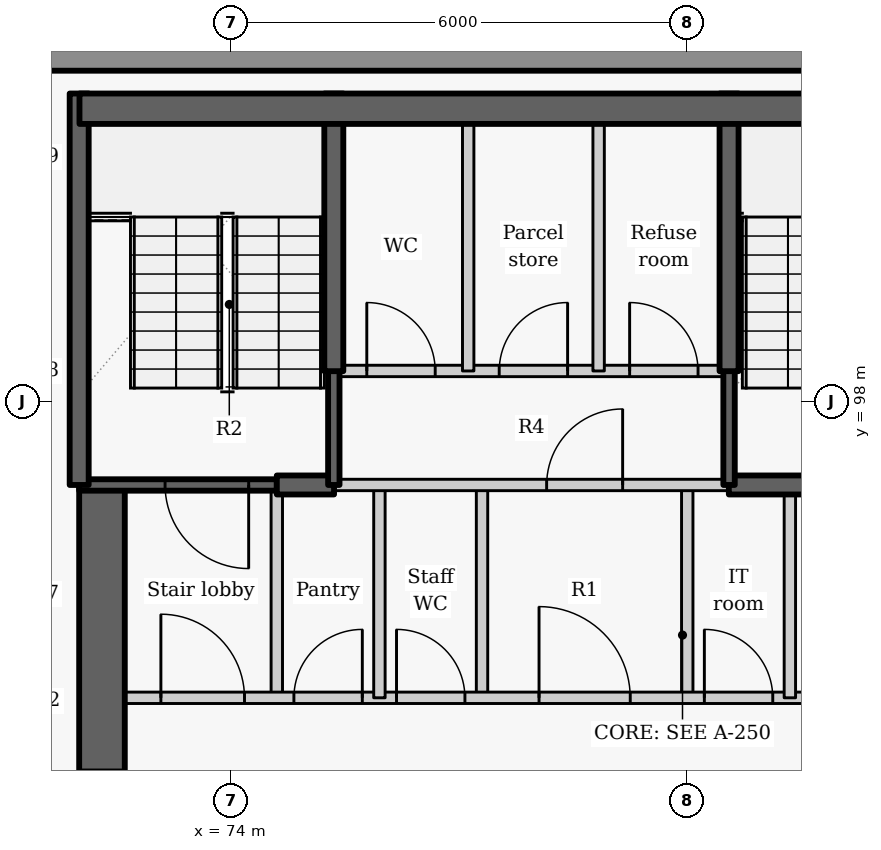
"""IFC4 building model, lengths in metres.
Left out: names, types, materials, properties, quantities, classifications, styles, units other than length and angle.
Written with IfcOpenShell. Run it as: python <this file> out.ifc"""

import sys

from ifc_helpers import new_model, si_unit, direction, frame, frame_2d, origin, place, context, subcontext, project, spatial, rectangle, extrude, element, fill, save


model = new_model("IFC4")
c1 = context("Model", 3, precision=1e-05, world=origin(), true_north=direction((0.0, 1.0)))
c2 = subcontext(c1, "Body", "Model", "MODEL_VIEW")
j1 = project(units=[si_unit("LENGTHUNIT", "METRE"), si_unit("PLANEANGLEUNIT", "RADIAN")], contexts=[c1])
p1 = place(None, origin())
s1 = spatial("IfcSite", under=j1, at=p1, CompositionType="ELEMENT")
p2 = place(p1, origin())
s2 = spatial("IfcBuilding", under=s1, at=p2, CompositionType="ELEMENT")
p3 = place(p2, frame((0.0, 0.0, 290.4)))
s3 = spatial("IfcBuildingStorey", under=s2, at=p3, CompositionType="ELEMENT", Elevation=290.4)
p4 = place(p3, frame((89.549, 102.5, 0.0), z_axis=(0.0, 0.0, 1.0), x_axis=(-1.0, 0.0, 0.0)))
e1 = element("IfcWall", 1, at=p4, inside=s3, PredefinedType="SOLIDWALL", context=c2, shape_type="SweptSolid", body=[
    extrude(rectangle(XDim=19.134, YDim=0.3, at=frame_2d((9.567, 0.0))), origin(), (0.0, 0.0, 1.0), 2.725),
])
p5 = place(p3, frame((74.6, 94.1, 0.0), z_axis=(0.0, 0.0, 1.0), x_axis=(0.0, 1.0, 0.0)))
e2 = element("IfcWall", 2, at=p5, inside=s3, PredefinedType="PARTITIONING", context=c2, shape_type="SweptSolid", body=[
    extrude(rectangle(XDim=2.8, YDim=0.15, at=frame_2d((1.4, 0.0))), origin(), (0.0, 0.0, 1.0), 3.325),
])
p6 = place(p3, frame((72.3, 87.8, -0.275), z_axis=(0.0, 0.0, 1.0), x_axis=(0.0, 1.0, 0.0)))
e3 = element("IfcWall", 3, at=p6, inside=s3, PredefinedType="SHEAR", context=c2, shape_type="SweptSolid", body=[
    extrude(rectangle(XDim=9.1, YDim=0.6, at=frame_2d((4.55, 0.0))), origin(), (0.0, 0.0, 1.0), 3.6),
])
p7 = place(p6, frame((3.85, 0.0, 0.275)))
e4 = element("IfcOpeningElement", 4, at=p7, cuts=e3, PredefinedType="OPENING", context=c2, shape_type="SweptSolid", body=[
    extrude(rectangle(XDim=1.5, YDim=2.1, at=frame_2d((0.75, 1.05))), frame((0.0, 0.31, 0.0), z_axis=(0.0, -1.0, 0.0), x_axis=(1.0, 0.0, 0.0)), (0.0, 0.0, 1.0), 0.62),
])
for number, where, z_axis, x_axis in (
    (5, (77.3, 94.1, 0.0), (0.0, 0.0, 1.0), (0.0, 1.0, 0.0)),
    (6, (80.0, 94.1, 0.0), (0.0, 0.0, 1.0), (0.0, 1.0, 0.0)),
):
    element("IfcWall", number, at=place(p3, frame(where, z_axis=z_axis, x_axis=x_axis)), inside=s3, PredefinedType="PARTITIONING", context=c2, shape_type="SweptSolid", body=[
        extrude(rectangle(XDim=2.8, YDim=0.15, at=frame_2d((1.4, 0.0))), origin(), (0.0, 0.0, 1.0), 3.325),
    ])
p8 = place(p3, frame((72.0, 94.1, 0.0), z_axis=(0.0, 0.0, 1.0), x_axis=(1.0, 0.0, 0.0)))
e7 = element("IfcWall", 7, at=p8, inside=s3, PredefinedType="PARTITIONING", context=c2, shape_type="SweptSolid", body=[
    extrude(rectangle(XDim=10.703, YDim=0.15, at=frame_2d((5.352, 0.0))), origin(), (0.0, 0.0, 1.0), 3.325),
])
p9 = place(p8, frame((1.075, 0.0, 0.0)))
e8 = element("IfcOpeningElement", 8, at=p9, cuts=e7, PredefinedType="OPENING", context=c2, shape_type="SweptSolid", body=[
    extrude(rectangle(XDim=1.1, YDim=2.1, at=frame_2d((0.55, 1.05))), frame((0.0, 0.085, 0.0), z_axis=(0.0, -1.0, 0.0), x_axis=(1.0, 0.0, 0.0)), (0.0, 0.0, 1.0), 0.17),
])
p10 = place(p8, frame((2.825, 0.0, 0.0)))
e9 = element("IfcOpeningElement", 9, at=p10, cuts=e7, PredefinedType="OPENING", context=c2, shape_type="SweptSolid", body=[
    extrude(rectangle(XDim=0.9, YDim=2.1, at=frame_2d((0.45, 1.05))), frame((0.0, 0.085, 0.0), z_axis=(0.0, -1.0, 0.0), x_axis=(1.0, 0.0, 0.0)), (0.0, 0.0, 1.0), 0.17),
])
p11 = place(p8, frame((4.175, 0.0, 0.0)))
e10 = element("IfcOpeningElement", 10, at=p11, cuts=e7, PredefinedType="OPENING", context=c2, shape_type="SweptSolid", body=[
    extrude(rectangle(XDim=0.9, YDim=2.1, at=frame_2d((0.45, 1.05))), frame((0.0, 0.085, 0.0), z_axis=(0.0, -1.0, 0.0), x_axis=(1.0, 0.0, 0.0)), (0.0, 0.0, 1.0), 0.17),
])
p12 = place(p8, frame((6.05, 0.0, 0.0)))
e11 = element("IfcOpeningElement", 11, at=p12, cuts=e7, PredefinedType="OPENING", context=c2, shape_type="SweptSolid", body=[
    extrude(rectangle(XDim=1.2, YDim=2.1, at=frame_2d((0.6, 1.05))), frame((0.0, 0.085, 0.0), z_axis=(0.0, -1.0, 0.0), x_axis=(1.0, 0.0, 0.0)), (0.0, 0.0, 1.0), 0.17),
])
p13 = place(p8, frame((8.225, 0.0, 0.0)))
e12 = element("IfcOpeningElement", 12, at=p13, cuts=e7, PredefinedType="OPENING", context=c2, shape_type="SweptSolid", body=[
    extrude(rectangle(XDim=0.9, YDim=2.1, at=frame_2d((0.45, 1.05))), frame((0.0, 0.085, 0.0), z_axis=(0.0, -1.0, 0.0), x_axis=(1.0, 0.0, 0.0)), (0.0, 0.0, 1.0), 0.17),
])
p14 = place(p8, frame((9.575, 0.0, 0.0)))
e13 = element("IfcOpeningElement", 13, at=p14, cuts=e7, PredefinedType="OPENING", context=c2, shape_type="SweptSolid", body=[
    extrude(rectangle(XDim=0.9, YDim=2.1, at=frame_2d((0.45, 1.05))), frame((0.0, 0.085, 0.0), z_axis=(0.0, -1.0, 0.0), x_axis=(1.0, 0.0, 0.0)), (0.0, 0.0, 1.0), 0.17),
])
p15 = place(p3, frame((74.6, 96.9, -0.275), z_axis=(0.0, 0.0, 1.0), x_axis=(-1.0, 0.0, 0.0)))
e14 = element("IfcWall", 14, at=p15, inside=s3, PredefinedType="SHEAR", context=c2, shape_type="SweptSolid", body=[
    extrude(rectangle(XDim=2.6, YDim=0.15, at=frame_2d((1.3, 0.0))), origin(), (0.0, 0.0, 1.0), 3.6),
])
p16 = place(p15, frame((0.37, 0.0, 0.275)))
e15 = element("IfcOpeningElement", 15, at=p16, cuts=e14, PredefinedType="OPENING", context=c2, shape_type="SweptSolid", body=[
    extrude(rectangle(XDim=1.1, YDim=2.1, at=frame_2d((0.55, 1.05))), frame((0.0, 0.085, 0.0), z_axis=(0.0, -1.0, 0.0), x_axis=(1.0, 0.0, 0.0)), (0.0, 0.0, 1.0), 0.17),
])
p17 = place(p3, frame((75.95, 94.1, 0.0), z_axis=(0.0, 0.0, 1.0), x_axis=(0.0, 1.0, 0.0)))
e16 = element("IfcWall", 16, at=p17, inside=s3, PredefinedType="PARTITIONING", context=c2, shape_type="SweptSolid", body=[
    extrude(rectangle(XDim=2.8, YDim=0.15, at=frame_2d((1.4, 0.0))), origin(), (0.0, 0.0, 1.0), 3.325),
])
p18 = place(p3, frame((74.6, 96.9, -0.275), z_axis=(0.0, 0.0, 1.0), x_axis=(1.0, 0.0, 0.0)))
e17 = element("IfcWall", 17, at=p18, inside=s3, PredefinedType="SHEAR", context=c2, shape_type="SweptSolid", body=[
    extrude(rectangle(XDim=0.753, YDim=0.25, at=frame_2d((0.376, 0.0))), origin(), (0.0, 0.0, 1.0), 3.6),
])
p19 = place(p3, frame((80.547, 96.9, -0.275), z_axis=(0.0, 0.0, 1.0), x_axis=(1.0, 0.0, 0.0)))
e18 = element("IfcWall", 18, at=p19, inside=s3, PredefinedType="SHEAR", context=c2, shape_type="SweptSolid", body=[
    extrude(rectangle(XDim=7.453, YDim=0.25, at=frame_2d((3.727, 0.0))), origin(), (0.0, 0.0, 1.0), 3.6),
])
p20 = place(p19, frame((3.302, 0.0, 0.275)))
e19 = element("IfcOpeningElement", 19, at=p20, cuts=e18, PredefinedType="OPENING", context=c2, shape_type="SweptSolid", body=[
    extrude(rectangle(XDim=1.1, YDim=2.1, at=frame_2d((0.55, 1.05))), frame((0.0, 0.135, 0.0), z_axis=(0.0, -1.0, 0.0), x_axis=(1.0, 0.0, 0.0)), (0.0, 0.0, 1.0), 0.27),
])
p21 = place(p3, frame((75.347, 96.9, 0.0), z_axis=(0.0, 0.0, 1.0), x_axis=(1.0, 0.0, 0.0)))
e20 = element("IfcWall", 20, at=p21, inside=s3, PredefinedType="PARTITIONING", context=c2, shape_type="SweptSolid", body=[
    extrude(rectangle(XDim=5.206, YDim=0.15, at=frame_2d((2.603, 0.0))), origin(), (0.0, 0.0, 1.0), 3.325),
])
p22 = place(p21, frame((2.803, 0.0, 0.0)))
e21 = element("IfcOpeningElement", 21, at=p22, cuts=e20, PredefinedType="OPENING", context=c2, shape_type="SweptSolid", body=[
    extrude(rectangle(XDim=1.0, YDim=2.1, at=frame_2d((0.5, 1.05))), frame((0.0, 0.085, 0.0), z_axis=(0.0, -1.0, 0.0), x_axis=(1.0, 0.0, 0.0)), (0.0, 0.0, 1.0), 0.17),
])
p23 = place(p3, frame((81.35, 94.1, 0.0), z_axis=(0.0, 0.0, 1.0), x_axis=(0.0, 1.0, 0.0)))
e22 = element("IfcWall", 22, at=p23, inside=s3, PredefinedType="PARTITIONING", context=c2, shape_type="SweptSolid", body=[
    extrude(rectangle(XDim=2.8, YDim=0.15, at=frame_2d((1.4, 0.0))), origin(), (0.0, 0.0, 1.0), 3.325),
])
p24 = place(p3, frame((75.35, 96.9, -0.275), z_axis=(0.0, 0.0, 1.0), x_axis=(0.0, 1.0, 0.0)))
e23 = element("IfcWall", 23, at=p24, inside=s3, PredefinedType="SHEAR", context=c2, shape_type="SweptSolid", body=[
    extrude(rectangle(XDim=1.503, YDim=0.15, at=frame_2d((0.751, 0.0))), origin(), (0.0, 0.0, 1.0), 3.6),
])
p25 = place(p3, frame((75.35, 98.397, -0.275), z_axis=(0.0, 0.0, 1.0), x_axis=(0.0, 1.0, 0.0)))
e24 = element("IfcWall", 24, at=p25, inside=s3, PredefinedType="SHEAR", context=c2, shape_type="SweptSolid", body=[
    extrude(rectangle(XDim=3.653, YDim=0.25, at=frame_2d((1.827, 0.0))), origin(), (0.0, 0.0, 1.0), 3.6),
])
p26 = place(p3, frame((72.0, 96.9, -0.275), z_axis=(0.0, 0.0, 1.0), x_axis=(0.0, 1.0, 0.0)))
e25 = element("IfcWall", 25, at=p26, inside=s3, PredefinedType="SHEAR", context=c2, shape_type="SweptSolid", body=[
    extrude(rectangle(XDim=5.15, YDim=0.25, at=frame_2d((2.575, 0.0))), origin(), (0.0, 0.0, 1.0), 3.6),
])
p27 = place(p3, frame((80.55, 96.9, -0.275), z_axis=(0.0, 0.0, 1.0), x_axis=(0.0, 1.0, 0.0)))
e26 = element("IfcWall", 26, at=p27, inside=s3, PredefinedType="SHEAR", context=c2, shape_type="SweptSolid", body=[
    extrude(rectangle(XDim=1.503, YDim=0.15, at=frame_2d((0.751, 0.0))), origin(), (0.0, 0.0, 1.0), 3.6),
])
p28 = place(p3, frame((80.55, 98.397, -0.275), z_axis=(0.0, 0.0, 1.0), x_axis=(0.0, 1.0, 0.0)))
e27 = element("IfcWall", 27, at=p28, inside=s3, PredefinedType="SHEAR", context=c2, shape_type="SweptSolid", body=[
    extrude(rectangle(XDim=3.653, YDim=0.25, at=frame_2d((1.827, 0.0))), origin(), (0.0, 0.0, 1.0), 3.6),
])
p29 = place(p3, frame((75.35, 98.4, 0.0), z_axis=(0.0, 0.0, 1.0), x_axis=(1.0, 0.0, 0.0)))
e28 = element("IfcWall", 28, at=p29, inside=s3, PredefinedType="PARTITIONING", context=c2, shape_type="SweptSolid", body=[
    extrude(rectangle(XDim=5.2, YDim=0.15, at=frame_2d((2.6, 0.0))), origin(), (0.0, 0.0, 1.0), 3.325),
])
p30 = place(p29, frame((0.434, 0.0, 0.0)))
e29 = element("IfcOpeningElement", 29, at=p30, cuts=e28, PredefinedType="OPENING", context=c2, shape_type="SweptSolid", body=[
    extrude(rectangle(XDim=0.9, YDim=2.1, at=frame_2d((0.45, 1.05))), frame((0.0, 0.085, 0.0), z_axis=(0.0, -1.0, 0.0), x_axis=(1.0, 0.0, 0.0)), (0.0, 0.0, 1.0), 0.17),
])
p31 = place(p29, frame((2.176, 0.0, 0.0)))
e30 = element("IfcOpeningElement", 30, at=p31, cuts=e28, PredefinedType="OPENING", context=c2, shape_type="SweptSolid", body=[
    extrude(rectangle(XDim=0.9, YDim=2.1, at=frame_2d((0.45, 1.05))), frame((0.0, 0.085, 0.0), z_axis=(0.0, -1.0, 0.0), x_axis=(1.0, 0.0, 0.0)), (0.0, 0.0, 1.0), 0.17),
])
p32 = place(p29, frame((3.892, 0.0, 0.0)))
e31 = element("IfcOpeningElement", 31, at=p32, cuts=e28, PredefinedType="OPENING", context=c2, shape_type="SweptSolid", body=[
    extrude(rectangle(XDim=0.9, YDim=2.1, at=frame_2d((0.45, 1.05))), frame((0.0, 0.085, 0.0), z_axis=(0.0, -1.0, 0.0), x_axis=(1.0, 0.0, 0.0)), (0.0, 0.0, 1.0), 0.17),
])
for number, where, z_axis, x_axis in (
    (32, (77.118, 98.4, 0.0), (0.0, 0.0, 1.0), (0.0, 1.0, 0.0)),
    (33, (78.834, 98.4, 0.0), (0.0, 0.0, 1.0), (0.0, 1.0, 0.0)),
):
    element("IfcWall", number, at=place(p3, frame(where, z_axis=z_axis, x_axis=x_axis)), inside=s3, PredefinedType="PARTITIONING", context=c2, shape_type="SweptSolid", body=[
        extrude(rectangle(XDim=3.65, YDim=0.15, at=frame_2d((1.825, 0.0))), origin(), (0.0, 0.0, 1.0), 3.325),
    ])
p33 = place(p3, frame((72.004, 101.85, -0.275), z_axis=(0.0, 0.0, 1.0), x_axis=(1.0, 0.0, 0.0)))
e34 = element("IfcWall", 34, at=p33, inside=s3, PredefinedType="SHEAR", context=c2, shape_type="SweptSolid", body=[
    extrude(rectangle(XDim=15.992, YDim=0.4, at=frame_2d((7.996, 0.0))), origin(), (0.0, 0.0, 1.0), 3.6),
])
p34 = place(p9, origin())
e35 = element("IfcDoor", 35, at=p34, inside=s3, OperationType="SINGLE_SWING_LEFT", PredefinedType="DOOR", context=c2, shape_type="SweptSolid", body=[
    extrude(rectangle(XDim=1.1, YDim=2.1, at=frame_2d((0.55, 1.05))), frame((0.0, 0.025, 0.0), z_axis=(0.0, -1.0, 0.0), x_axis=(1.0, 0.0, 0.0)), (0.0, 0.0, 1.0), 0.05),
])
fill(e8, e35)
p35 = place(p10, origin())
e36 = element("IfcDoor", 36, at=p35, inside=s3, OperationType="SINGLE_SWING_RIGHT", PredefinedType="DOOR", context=c2, shape_type="SweptSolid", body=[
    extrude(rectangle(XDim=0.9, YDim=2.1, at=frame_2d((0.45, 1.05))), frame((0.0, 0.025, 0.0), z_axis=(0.0, -1.0, 0.0), x_axis=(1.0, 0.0, 0.0)), (0.0, 0.0, 1.0), 0.05),
])
fill(e9, e36)
p36 = place(p11, origin())
e37 = element("IfcDoor", 37, at=p36, inside=s3, OperationType="SINGLE_SWING_LEFT", PredefinedType="DOOR", context=c2, shape_type="SweptSolid", body=[
    extrude(rectangle(XDim=0.9, YDim=2.1, at=frame_2d((0.45, 1.05))), frame((0.0, 0.025, 0.0), z_axis=(0.0, -1.0, 0.0), x_axis=(1.0, 0.0, 0.0)), (0.0, 0.0, 1.0), 0.05),
])
fill(e10, e37)
p37 = place(p12, origin())
e38 = element("IfcDoor", 38, at=p37, inside=s3, OperationType="DOUBLE_DOOR_SINGLE_SWING", PredefinedType="DOOR", context=c2, shape_type="SweptSolid", body=[
    extrude(rectangle(XDim=1.2, YDim=2.1, at=frame_2d((0.6, 1.05))), frame((0.0, 0.025, 0.0), z_axis=(0.0, -1.0, 0.0), x_axis=(1.0, 0.0, 0.0)), (0.0, 0.0, 1.0), 0.05),
])
fill(e11, e38)
p38 = place(p13, origin())
e39 = element("IfcDoor", 39, at=p38, inside=s3, OperationType="SINGLE_SWING_LEFT", PredefinedType="DOOR", context=c2, shape_type="SweptSolid", body=[
    extrude(rectangle(XDim=0.9, YDim=2.1, at=frame_2d((0.45, 1.05))), frame((0.0, 0.025, 0.0), z_axis=(0.0, -1.0, 0.0), x_axis=(1.0, 0.0, 0.0)), (0.0, 0.0, 1.0), 0.05),
])
fill(e12, e39)
p39 = place(p22, origin())
e40 = element("IfcDoor", 40, at=p39, inside=s3, OperationType="SINGLE_SWING_RIGHT", PredefinedType="DOOR", context=c2, shape_type="SweptSolid", body=[
    extrude(rectangle(XDim=1.0, YDim=2.1, at=frame_2d((0.5, 1.05))), frame((0.0, 0.025, 0.0), z_axis=(0.0, -1.0, 0.0), x_axis=(1.0, 0.0, 0.0)), (0.0, 0.0, 1.0), 0.05),
])
fill(e21, e40)
p40 = place(p30, origin())
e41 = element("IfcDoor", 41, at=p40, inside=s3, OperationType="SINGLE_SWING_LEFT", PredefinedType="DOOR", context=c2, shape_type="SweptSolid", body=[
    extrude(rectangle(XDim=0.9, YDim=2.1, at=frame_2d((0.45, 1.05))), frame((0.0, 0.025, 0.0), z_axis=(0.0, -1.0, 0.0), x_axis=(1.0, 0.0, 0.0)), (0.0, 0.0, 1.0), 0.05),
])
fill(e29, e41)
p41 = place(p31, origin())
e42 = element("IfcDoor", 42, at=p41, inside=s3, OperationType="SINGLE_SWING_RIGHT", PredefinedType="DOOR", context=c2, shape_type="SweptSolid", body=[
    extrude(rectangle(XDim=0.9, YDim=2.1, at=frame_2d((0.45, 1.05))), frame((0.0, 0.025, 0.0), z_axis=(0.0, -1.0, 0.0), x_axis=(1.0, 0.0, 0.0)), (0.0, 0.0, 1.0), 0.05),
])
fill(e30, e42)
p42 = place(p32, origin())
e43 = element("IfcDoor", 43, at=p42, inside=s3, OperationType="SINGLE_SWING_LEFT", PredefinedType="DOOR", context=c2, shape_type="SweptSolid", body=[
    extrude(rectangle(XDim=0.9, YDim=2.1, at=frame_2d((0.45, 1.05))), frame((0.0, 0.025, 0.0), z_axis=(0.0, -1.0, 0.0), x_axis=(1.0, 0.0, 0.0)), (0.0, 0.0, 1.0), 0.05),
])
fill(e31, e43)
p43 = place(p16, origin())
e44 = element("IfcDoor", 44, at=p43, inside=s3, OperationType="SINGLE_SWING_LEFT", PredefinedType="DOOR", context=c2, shape_type="SweptSolid", body=[
    extrude(rectangle(XDim=1.1, YDim=2.1, at=frame_2d((0.55, 1.05))), frame((0.0, 0.025, 0.0), z_axis=(0.0, -1.0, 0.0), x_axis=(1.0, 0.0, 0.0)), (0.0, 0.0, 1.0), 0.05),
])
fill(e15, e44)
p44 = place(p7, origin())
e45 = element("IfcDoor", 45, at=p44, inside=s3, OperationType="DOUBLE_DOOR_SINGLE_SWING", PredefinedType="DOOR", context=c2, shape_type="SweptSolid", body=[
    extrude(rectangle(XDim=1.5, YDim=2.1, at=frame_2d((0.75, 1.05))), frame((0.0, 0.025, 0.0), z_axis=(0.0, -1.0, 0.0), x_axis=(1.0, 0.0, 0.0)), (0.0, 0.0, 1.0), 0.05),
])
fill(e4, e45)
save(model, sys.argv[1])
